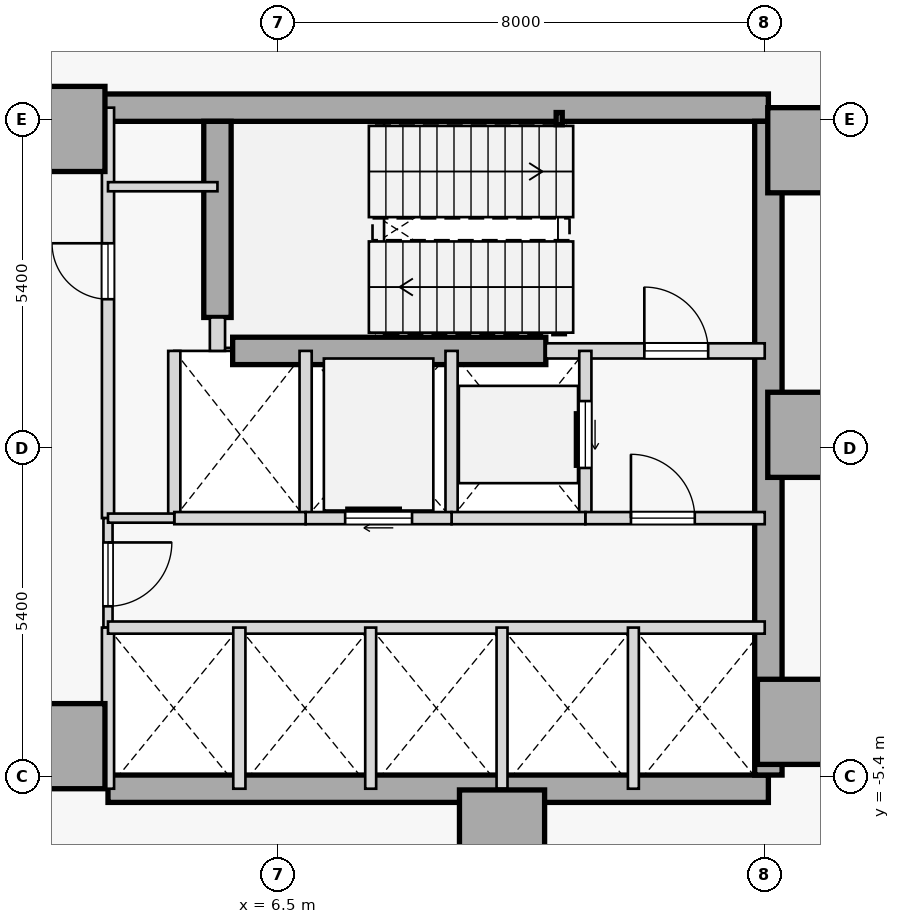
"""IFC4 building model, lengths in metres.
Left out: names, types, materials, properties, quantities, classifications, styles, units other than length and angle.
Written with IfcOpenShell. Run it as: python <this file> out.ifc"""

import sys

from ifc_helpers import new_model, si_unit, direction, frame, frame_2d, origin, origin_2d, place, context, subcontext, project, spatial, rectangle, hollow_rectangle, extrude, element, fill, save


model = new_model("IFC4")
c1 = context("Model", 3, precision=1e-05, world=origin(), true_north=direction((0.0, 1.0)))
c2 = subcontext(c1, "Body", "Model", "MODEL_VIEW")
j1 = project(units=[si_unit("LENGTHUNIT", "METRE"), si_unit("PLANEANGLEUNIT", "RADIAN")], contexts=[c1])
p1 = place(None, origin())
s1 = spatial("IfcSite", under=j1, at=p1, CompositionType="ELEMENT")
p2 = place(p1, origin())
s2 = spatial("IfcBuilding", under=s1, at=p2, CompositionType="ELEMENT")
p3 = place(p2, frame((0.0, 0.0, 78.8)))
s3 = spatial("IfcBuildingStorey", under=s2, at=p3, CompositionType="ELEMENT", Elevation=78.8)
for number, where, z_axis, x_axis in (
    (1, (15.25, 4.9, 0.0), (0.0, 0.0, 1.0), (1.0, 0.0, 0.0)),
    (2, (15.25, 0.22, 0.0), (0.0, 0.0, 1.0), (1.0, 0.0, 0.0)),
    (3, (15.08, -4.5, 0.0), (0.0, 0.0, 1.0), (1.0, 0.0, 0.0)),
    (4, (10.18, -6.32, 0.0), (0.0, 0.0, 1.0), (1.0, 0.0, 0.0)),
    (5, (2.95, -4.9, 0.0), (0.0, 0.0, 1.0), (1.0, 0.0, 0.0)),
    (6, (2.95, 5.25, 0.0), (0.0, 0.0, 1.0), (1.0, 0.0, 0.0)),
):
    element("IfcColumn", number, at=place(p3, frame(where, z_axis=z_axis, x_axis=x_axis)), inside=s3, PredefinedType="COLUMN", context=c2, shape_type="SweptSolid", body=[
        extrude(rectangle(XDim=1.4, YDim=1.4, at=origin_2d()), origin(), (0.0, 0.0, 1.0), 4.4),
    ])
p4 = place(p3, frame((3.15, 5.6, 0.0), z_axis=(0.0, 0.0, 1.0), x_axis=(1.0, 0.0, 0.0)))
e7 = element("IfcWall", 7, at=p4, inside=s3, PredefinedType="SHEAR", context=c2, shape_type="SweptSolid", body=[
    extrude(rectangle(XDim=11.41, YDim=0.45, at=frame_2d((5.705, 0.0))), origin(), (0.0, 0.0, 1.0), 4.15),
])
p5 = place(p3, frame((3.7, -5.6, 0.0), z_axis=(0.0, 0.0, 1.0), x_axis=(1.0, 0.0, 0.0)))
e8 = element("IfcWall", 8, at=p5, inside=s3, PredefinedType="SHEAR", context=c2, shape_type="SweptSolid", body=[
    extrude(rectangle(XDim=10.86, YDim=0.45, at=frame_2d((5.43, 0.0))), origin(), (0.0, 0.0, 1.0), 4.15),
])
p6 = place(p3, frame((14.56, -5.375, 0.0), z_axis=(0.0, 0.0, 1.0), x_axis=(0.0, 1.0, 0.0)))
e9 = element("IfcWall", 9, at=p6, inside=s3, PredefinedType="SHEAR", context=c2, shape_type="SweptSolid", body=[
    extrude(rectangle(XDim=10.75, YDim=0.45, at=frame_2d((5.375, 0.0))), origin(), (0.0, 0.0, 1.0), 4.15),
])
p7 = place(p3, frame((5.5, 2.15, 0.0), z_axis=(0.0, 0.0, 1.0), x_axis=(0.0, 1.0, 0.0)))
e10 = element("IfcWall", 10, at=p7, inside=s3, PredefinedType="SHEAR", context=c2, shape_type="SweptSolid", body=[
    extrude(rectangle(XDim=3.225, YDim=0.45, at=frame_2d((1.613, 0.0))), origin(), (0.0, 0.0, 1.0), 4.15),
])
p8 = place(p3, frame((5.75, 1.6, 0.0), z_axis=(0.0, 0.0, 1.0), x_axis=(1.0, 0.0, 0.0)))
e11 = element("IfcWall", 11, at=p8, inside=s3, PredefinedType="SHEAR", context=c2, shape_type="SweptSolid", body=[
    extrude(rectangle(XDim=5.15, YDim=0.45, at=frame_2d((2.575, 0.0))), origin(), (0.0, 0.0, 1.0), 4.15),
])
p9 = place(p3, frame((11.12, 5.42, 0.0), z_axis=(0.0, 0.0, 1.0), x_axis=(1.0, 0.0, 0.0)))
e12 = element("IfcColumn", 12, at=p9, inside=s3, PredefinedType="COLUMN", context=c2, shape_type="SweptSolid", body=[
    extrude(hollow_rectangle(XDim=0.1, YDim=0.2, WallThickness=0.008, at=origin_2d()), origin(), (0.0, 0.0, 1.0), 4.4),
])
p10 = place(p3, frame((10.9, 1.6, 0.0), z_axis=(0.0, 0.0, 1.0), x_axis=(1.0, 0.0, 0.0)))
e13 = element("IfcWall", 13, at=p10, inside=s3, PredefinedType="STANDARD", context=c2, shape_type="SweptSolid", body=[
    extrude(rectangle(XDim=3.6, YDim=0.25, at=frame_2d((1.8, 0.0))), origin(), (0.0, 0.0, 1.0), 4.15),
])
p11 = place(p10, frame((1.62, 0.0, 0.0)))
e14 = element("IfcOpeningElement", 14, at=p11, cuts=e13, PredefinedType="OPENING", context=c2, shape_type="SweptSolid", body=[
    extrude(rectangle(XDim=1.05, YDim=2.15, at=frame_2d((0.525, 1.075))), frame((0.0, 0.135, 0.0), z_axis=(0.0, -1.0, 0.0), x_axis=(1.0, 0.0, 0.0)), (0.0, 0.0, 1.0), 0.27),
])
p12 = place(p3, frame((5.5, 1.6, 0.0), z_axis=(0.0, 0.0, 1.0), x_axis=(0.0, 1.0, 0.0)))
e15 = element("IfcWall", 15, at=p12, inside=s3, PredefinedType="STANDARD", context=c2, shape_type="SweptSolid", body=[
    extrude(rectangle(XDim=0.55, YDim=0.25, at=frame_2d((0.275, 0.0))), origin(), (0.0, 0.0, 1.0), 4.15),
])
p13 = place(p3, frame((3.7, -1.15, 0.0), z_axis=(0.0, 0.0, 1.0), x_axis=(0.0, 1.0, 0.0)))
e16 = element("IfcWall", 16, at=p13, inside=s3, PredefinedType="STANDARD", context=c2, shape_type="SweptSolid", body=[
    extrude(rectangle(XDim=6.75, YDim=0.2, at=frame_2d((3.375, 0.0))), origin(), (0.0, 0.0, 1.0), 4.15),
])
p14 = place(p13, frame((3.6, 0.0, 0.0)))
e17 = element("IfcOpeningElement", 17, at=p14, cuts=e16, PredefinedType="OPENING", context=c2, shape_type="SweptSolid", body=[
    extrude(rectangle(XDim=0.92, YDim=2.15, at=frame_2d((0.46, 1.075))), frame((0.0, 0.11, 0.0), z_axis=(0.0, -1.0, 0.0), x_axis=(1.0, 0.0, 0.0)), (0.0, 0.0, 1.0), 0.22),
])
p15 = place(p3, frame((3.7, -2.95, 0.0), z_axis=(0.0, 0.0, 1.0), x_axis=(0.0, 1.0, 0.0)))
e18 = element("IfcWall", 18, at=p15, inside=s3, PredefinedType="PARTITIONING", context=c2, shape_type="SweptSolid", body=[
    extrude(rectangle(XDim=1.8, YDim=0.15, at=frame_2d((0.9, 0.0))), origin(), (0.0, 0.0, 1.0), 4.15),
])
p16 = place(p15, frame((0.35, 0.0, 0.0)))
e19 = element("IfcOpeningElement", 19, at=p16, cuts=e18, PredefinedType="OPENING", context=c2, shape_type="SweptSolid", body=[
    extrude(rectangle(XDim=1.05, YDim=2.18, at=frame_2d((0.525, 1.09))), frame((0.0, 0.085, 0.0), z_axis=(0.0, -1.0, 0.0), x_axis=(1.0, 0.0, 0.0)), (0.0, 0.0, 1.0), 0.17),
])
p17 = place(p3, frame((3.7, -5.6, 0.0), z_axis=(0.0, 0.0, 1.0), x_axis=(0.0, 1.0, 0.0)))
e20 = element("IfcWall", 20, at=p17, inside=s3, PredefinedType="STANDARD", context=c2, shape_type="SweptSolid", body=[
    extrude(rectangle(XDim=2.65, YDim=0.2, at=frame_2d((1.325, 0.0))), origin(), (0.0, 0.0, 1.0), 4.15),
])
p18 = place(p3, frame((11.55, -1.15, 0.0), z_axis=(0.0, 0.0, 1.0), x_axis=(0.0, 1.0, 0.0)))
e21 = element("IfcWall", 21, at=p18, inside=s3, PredefinedType="STANDARD", context=c2, shape_type="SweptSolid", body=[
    extrude(rectangle(XDim=2.75, YDim=0.2, at=frame_2d((1.375, 0.0))), origin(), (0.0, 0.0, 1.0), 4.15),
])
p19 = place(p18, frame((0.825, 0.0, 0.0)))
e22 = element("IfcOpeningElement", 22, at=p19, cuts=e21, PredefinedType="OPENING", context=c2, shape_type="SweptSolid", body=[
    extrude(rectangle(XDim=1.1, YDim=2.15, at=frame_2d((0.55, 1.075))), frame((0.0, 0.11, 0.0), z_axis=(0.0, -1.0, 0.0), x_axis=(1.0, 0.0, 0.0)), (0.0, 0.0, 1.0), 0.22),
])
p20 = place(p3, frame((9.35, -1.15, 0.0), z_axis=(0.0, 0.0, 1.0), x_axis=(0.0, 1.0, 0.0)))
e23 = element("IfcWall", 23, at=p20, inside=s3, PredefinedType="STANDARD", context=c2, shape_type="SweptSolid", body=[
    extrude(rectangle(XDim=2.75, YDim=0.2, at=frame_2d((1.375, 0.0))), origin(), (0.0, 0.0, 1.0), 4.15),
])
p21 = place(p3, frame((11.55, -1.15, 0.0), z_axis=(0.0, 0.0, 1.0), x_axis=(1.0, 0.0, 0.0)))
e24 = element("IfcWall", 24, at=p21, inside=s3, PredefinedType="STANDARD", context=c2, shape_type="SweptSolid", body=[
    extrude(rectangle(XDim=2.95, YDim=0.2, at=frame_2d((1.475, 0.0))), origin(), (0.0, 0.0, 1.0), 4.15),
])
p22 = place(p21, frame((0.75, 0.0, 0.0)))
e25 = element("IfcOpeningElement", 25, at=p22, cuts=e24, PredefinedType="OPENING", context=c2, shape_type="SweptSolid", body=[
    extrude(rectangle(XDim=1.05, YDim=2.18, at=frame_2d((0.525, 1.09))), frame((0.0, 0.11, 0.0), z_axis=(0.0, -1.0, 0.0), x_axis=(1.0, 0.0, 0.0)), (0.0, 0.0, 1.0), 0.22),
])
p23 = place(p3, frame((9.35, -1.15, 0.0), z_axis=(0.0, 0.0, 1.0), x_axis=(1.0, 0.0, 0.0)))
e26 = element("IfcWall", 26, at=p23, inside=s3, PredefinedType="STANDARD", context=c2, shape_type="SweptSolid", body=[
    extrude(rectangle(XDim=2.2, YDim=0.2, at=frame_2d((1.1, 0.0))), origin(), (0.0, 0.0, 1.0), 4.15),
])
p24 = place(p3, frame((6.95, -1.15, 0.0), z_axis=(0.0, 0.0, 1.0), x_axis=(0.0, 1.0, 0.0)))
e27 = element("IfcWall", 27, at=p24, inside=s3, PredefinedType="STANDARD", context=c2, shape_type="SweptSolid", body=[
    extrude(rectangle(XDim=2.75, YDim=0.2, at=frame_2d((1.375, 0.0))), origin(), (0.0, 0.0, 1.0), 4.15),
])
p25 = place(p3, frame((6.95, -1.15, 0.0), z_axis=(0.0, 0.0, 1.0), x_axis=(1.0, 0.0, 0.0)))
e28 = element("IfcWall", 28, at=p25, inside=s3, PredefinedType="STANDARD", context=c2, shape_type="SweptSolid", body=[
    extrude(rectangle(XDim=2.4, YDim=0.2, at=frame_2d((1.2, 0.0))), origin(), (0.0, 0.0, 1.0), 4.15),
])
p26 = place(p25, frame((0.65, 0.0, 0.0)))
e29 = element("IfcOpeningElement", 29, at=p26, cuts=e28, PredefinedType="OPENING", context=c2, shape_type="SweptSolid", body=[
    extrude(rectangle(XDim=1.1, YDim=2.15, at=frame_2d((0.55, 1.075))), frame((0.0, 0.11, 0.0), z_axis=(0.0, -1.0, 0.0), x_axis=(1.0, 0.0, 0.0)), (0.0, 0.0, 1.0), 0.22),
])
p27 = place(p3, frame((4.79, -1.15, 0.0), z_axis=(0.0, 0.0, 1.0), x_axis=(0.0, 1.0, 0.0)))
e30 = element("IfcWall", 30, at=p27, inside=s3, PredefinedType="STANDARD", context=c2, shape_type="SweptSolid", body=[
    extrude(rectangle(XDim=2.75, YDim=0.2, at=frame_2d((1.375, 0.0))), origin(), (0.0, 0.0, 1.0), 4.15),
])
p28 = place(p3, frame((4.79, -1.15, 0.0), z_axis=(0.0, 0.0, 1.0), x_axis=(1.0, 0.0, 0.0)))
e31 = element("IfcWall", 31, at=p28, inside=s3, PredefinedType="STANDARD", context=c2, shape_type="SweptSolid", body=[
    extrude(rectangle(XDim=2.16, YDim=0.2, at=frame_2d((1.08, 0.0))), origin(), (0.0, 0.0, 1.0), 4.15),
])
p29 = place(p3, frame((3.7, -1.15, 0.0), z_axis=(0.0, 0.0, 1.0), x_axis=(1.0, 0.0, 0.0)))
e32 = element("IfcWall", 32, at=p29, inside=s3, PredefinedType="PARTITIONING", context=c2, shape_type="SweptSolid", body=[
    extrude(rectangle(XDim=1.09, YDim=0.15, at=frame_2d((0.545, 0.0))), origin(), (0.0, 0.0, 1.0), 4.15),
])
p30 = place(p3, frame((3.7, -2.95, 0.0), z_axis=(0.0, 0.0, 1.0), x_axis=(1.0, 0.0, 0.0)))
e33 = element("IfcWall", 33, at=p30, inside=s3, PredefinedType="STANDARD", context=c2, shape_type="SweptSolid", body=[
    extrude(rectangle(XDim=10.8, YDim=0.2, at=frame_2d((5.4, 0.0))), origin(), (0.0, 0.0, 1.0), 4.15),
])
p31 = place(p3, frame((5.86, -5.6, 0.0), z_axis=(0.0, 0.0, 1.0), x_axis=(0.0, 1.0, 0.0)))
e34 = element("IfcWall", 34, at=p31, inside=s3, PredefinedType="STANDARD", context=c2, shape_type="SweptSolid", body=[
    extrude(rectangle(XDim=2.65, YDim=0.2, at=frame_2d((1.325, 0.0))), origin(), (0.0, 0.0, 1.0), 4.15),
])
for number, where, z_axis, x_axis in (
    (35, (12.34, -5.6, 0.0), (0.0, 0.0, 1.0), (0.0, 1.0, 0.0)),
    (36, (10.18, -5.6, 0.0), (0.0, 0.0, 1.0), (0.0, 1.0, 0.0)),
    (37, (8.02, -5.6, 0.0), (0.0, 0.0, 1.0), (0.0, 1.0, 0.0)),
):
    element("IfcWall", number, at=place(p3, frame(where, z_axis=z_axis, x_axis=x_axis)), inside=s3, PredefinedType="STANDARD", context=c2, shape_type="SweptSolid", body=[
        extrude(rectangle(XDim=2.65, YDim=0.18, at=frame_2d((1.325, 0.0))), origin(), (0.0, 0.0, 1.0), 4.15),
    ])
p32 = place(p3, frame((3.7, 4.3, 0.0), z_axis=(0.0, 0.0, 1.0), x_axis=(1.0, 0.0, 0.0)))
e38 = element("IfcWall", 38, at=p32, inside=s3, PredefinedType="PARTITIONING", context=c2, shape_type="SweptSolid", body=[
    extrude(rectangle(XDim=1.8, YDim=0.15, at=frame_2d((0.9, 0.0))), origin(), (0.0, 0.0, 1.0), 4.15),
])
p33 = place(p11, origin())
e39 = element("IfcDoor", 39, at=p33, inside=s3, OperationType="SINGLE_SWING_LEFT", PredefinedType="DOOR", context=c2, shape_type="SweptSolid", body=[
    extrude(rectangle(XDim=1.05, YDim=2.15, at=frame_2d((0.525, 1.075))), frame((0.0, 0.025, 0.0), z_axis=(0.0, -1.0, 0.0), x_axis=(1.0, 0.0, 0.0)), (0.0, 0.0, 1.0), 0.05),
])
fill(e14, e39)
p34 = place(p22, origin())
e40 = element("IfcDoor", 40, at=p34, inside=s3, OperationType="SINGLE_SWING_LEFT", PredefinedType="DOOR", context=c2, shape_type="SweptSolid", body=[
    extrude(rectangle(XDim=1.05, YDim=2.18, at=frame_2d((0.525, 1.09))), frame((0.0, 0.025, 0.0), z_axis=(0.0, -1.0, 0.0), x_axis=(1.0, 0.0, 0.0)), (0.0, 0.0, 1.0), 0.05),
])
fill(e25, e40)
p35 = place(p16, frame((1.05, 0.0, 0.0), z_axis=(0.0, 0.0, 1.0), x_axis=(-1.0, 0.0, 0.0)))
e41 = element("IfcDoor", 41, at=p35, inside=s3, OperationType="SINGLE_SWING_RIGHT", PredefinedType="DOOR", context=c2, shape_type="SweptSolid", body=[
    extrude(rectangle(XDim=1.05, YDim=2.18, at=frame_2d((0.525, 1.09))), frame((0.0, 0.025, 0.0), z_axis=(0.0, -1.0, 0.0), x_axis=(1.0, 0.0, 0.0)), (0.0, 0.0, 1.0), 0.05),
])
fill(e19, e41)
p36 = place(p19, origin())
e42 = element("IfcDoor", 42, at=p36, inside=s3, OperationType="SLIDING_TO_RIGHT", PredefinedType="DOOR", context=c2, shape_type="SweptSolid", body=[
    extrude(rectangle(XDim=1.1, YDim=2.15, at=frame_2d((0.55, 1.075))), frame((0.0, 0.025, 0.0), z_axis=(0.0, -1.0, 0.0), x_axis=(1.0, 0.0, 0.0)), (0.0, 0.0, 1.0), 0.05),
])
fill(e22, e42)
p37 = place(p26, origin())
e43 = element("IfcDoor", 43, at=p37, inside=s3, OperationType="SLIDING_TO_RIGHT", PredefinedType="DOOR", context=c2, shape_type="SweptSolid", body=[
    extrude(rectangle(XDim=1.1, YDim=2.15, at=frame_2d((0.55, 1.075))), frame((0.0, 0.025, 0.0), z_axis=(0.0, -1.0, 0.0), x_axis=(1.0, 0.0, 0.0)), (0.0, 0.0, 1.0), 0.05),
])
fill(e29, e43)
p38 = place(p14, origin())
e44 = element("IfcDoor", 44, at=p38, inside=s3, OperationType="SINGLE_SWING_RIGHT", PredefinedType="DOOR", context=c2, shape_type="SweptSolid", body=[
    extrude(rectangle(XDim=0.92, YDim=2.15, at=frame_2d((0.46, 1.075))), frame((0.0, 0.025, 0.0), z_axis=(0.0, -1.0, 0.0), x_axis=(1.0, 0.0, 0.0)), (0.0, 0.0, 1.0), 0.05),
])
fill(e17, e44)
save(model, sys.argv[1])
